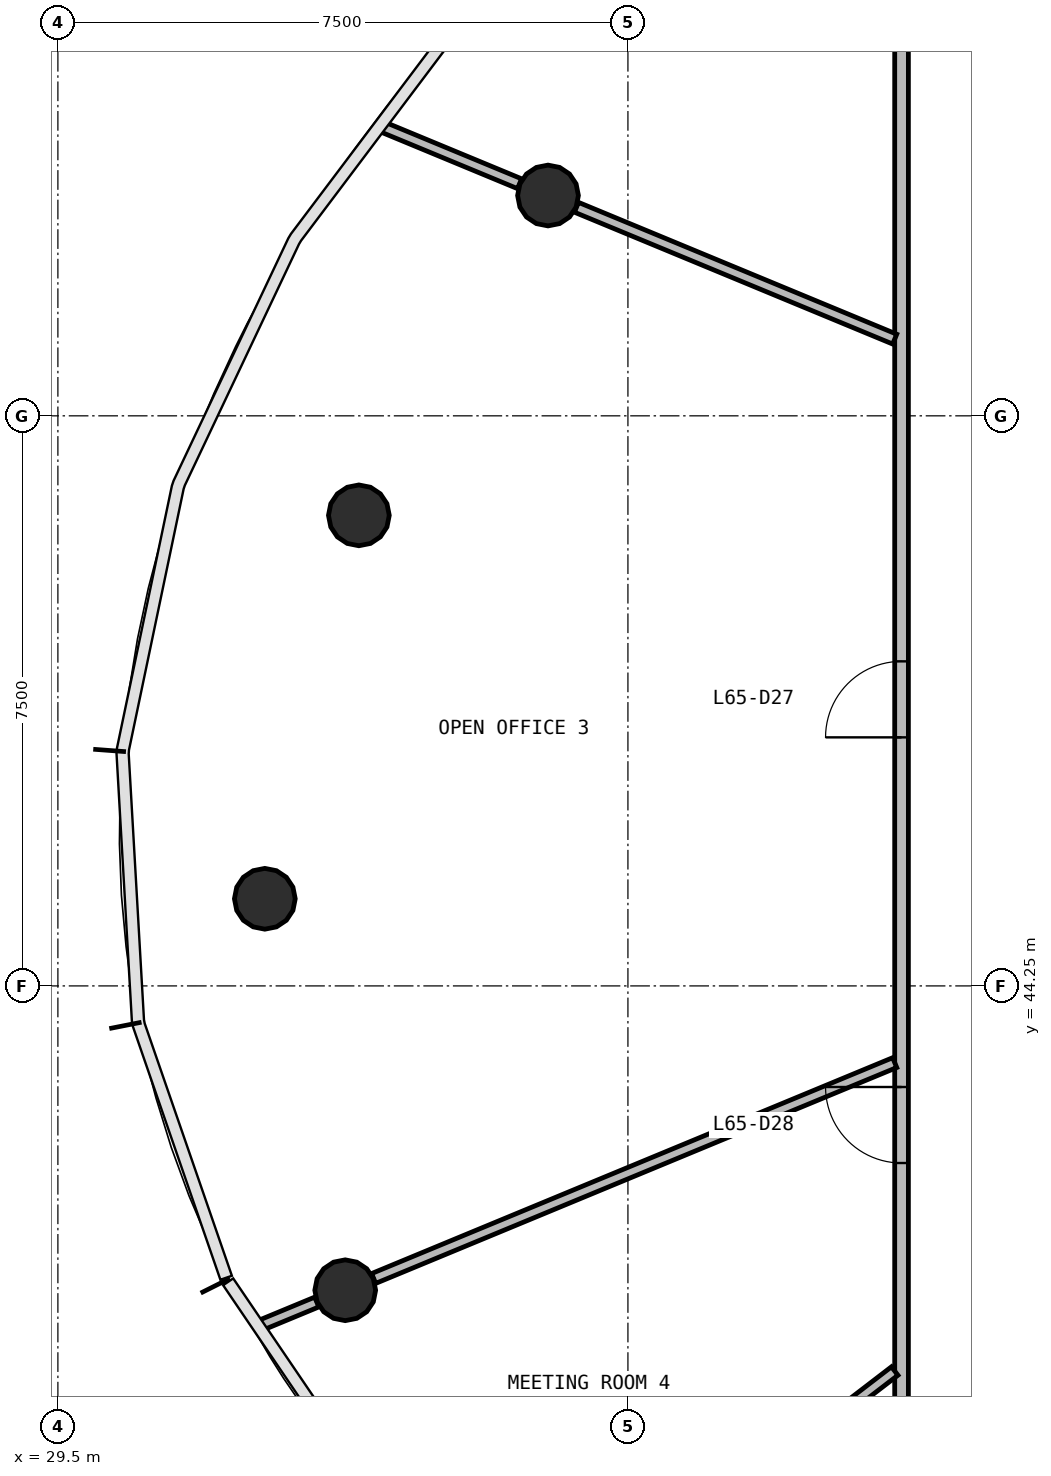
"""IFC4 building model, lengths in metres.
Left out: names, types, materials, properties, quantities, classifications, styles, units other than length and angle.
Written with IfcOpenShell. Run it as: python <this file> out.ifc"""

import sys

from ifc_helpers import new_model, si_unit, direction, frame, frame_2d, origin, origin_2d, place, context, subcontext, project, spatial, rectangle, circle, extrude, source, transform, mapped, element, fill, save


model = new_model("IFC4")
c1 = context("Model", 3, precision=1e-05, world=origin(), true_north=direction((0.0, 1.0)))
c2 = subcontext(c1, "Body", "Model", "MODEL_VIEW")
j1 = project(units=[si_unit("LENGTHUNIT", "METRE"), si_unit("PLANEANGLEUNIT", "RADIAN")], contexts=[c1])
p1 = place(None, origin())
s1 = spatial("IfcSite", under=j1, at=p1, CompositionType="ELEMENT")
p2 = place(p1, origin())
s2 = spatial("IfcBuilding", under=s1, at=p2, CompositionType="ELEMENT")
p3 = place(p2, frame((0.0, 0.0, 265.7)))
s3 = spatial("IfcBuildingStorey", under=s2, at=p3, CompositionType="ELEMENT", Elevation=265.7)
m1 = source(origin(), c2, "Body", "SweptSolid", [
    extrude(circle(Radius=0.4, at=origin_2d()), origin(), (0.0, 0.0, 1.0), 3.9),
])
for number, where, z_axis, x_axis in (
    (1, (35.948, 54.649, 0.0), (0.0, 0.0, 1.0), (1.0, 0.0, 0.0)),
    (2, (33.46, 50.441, 0.0), (0.0, 0.0, 1.0), (1.0, 0.0, 0.0)),
    (3, (32.223, 45.396, 0.0), (0.0, 0.0, 1.0), (1.0, 0.0, 0.0)),
    (4, (33.281, 40.246, 0.0), (0.0, 0.0, 1.0), (1.0, 0.0, 0.0)),
):
    element("IfcColumn", number, at=place(p3, frame(where, z_axis=z_axis, x_axis=x_axis)), inside=s3, PredefinedType="COLUMN", context=c2, shape_type="MappedRepresentation", body=[
        mapped(m1, transform((0.0, 0.0, 0.0), scale=1.0)),
    ])
p4 = place(p3, frame((40.6, 37.63, 0.0), z_axis=(0.0, 0.0, 1.0), x_axis=(0.0, 1.0, 0.0)))
e5 = element("IfcWall", 5, at=p4, inside=s3, PredefinedType="PARTITIONING", context=c2, shape_type="SweptSolid", body=[
    extrude(rectangle(XDim=20.74, YDim=0.18, at=frame_2d((10.37, 0.0))), origin(), (0.0, 0.0, 1.0), 2.92),
])
p5 = place(p4, frame((9.89, 0.0, 0.0)))
e6 = element("IfcOpeningElement", 6, at=p5, cuts=e5, PredefinedType="OPENING", context=c2, shape_type="SweptSolid", body=[
    extrude(rectangle(XDim=1.0, YDim=2.1, at=frame_2d((0.5, 1.05))), frame((0.0, 0.1, 0.0), z_axis=(0.0, -1.0, 0.0), x_axis=(1.0, 0.0, 0.0)), (0.0, 0.0, 1.0), 0.2),
])
p6 = place(p4, frame((4.29, 0.0, 0.0)))
e7 = element("IfcOpeningElement", 7, at=p6, cuts=e5, PredefinedType="OPENING", context=c2, shape_type="SweptSolid", body=[
    extrude(rectangle(XDim=1.0, YDim=2.1, at=frame_2d((0.5, 1.05))), frame((0.0, 0.1, 0.0), z_axis=(0.0, -1.0, 0.0), x_axis=(1.0, 0.0, 0.0)), (0.0, 0.0, 1.0), 0.2),
])
p7 = place(p3, frame((40.51, 43.241, 0.0), z_axis=(0.0, 0.0, 1.0), x_axis=(-0.92388089155, -0.38268015134, 0.0)))
e8 = element("IfcWall", 8, at=p7, inside=s3, PredefinedType="PARTITIONING", context=c2, shape_type="SweptSolid", body=[
    extrude(rectangle(XDim=7.42, YDim=0.14, at=frame_2d((3.71, 0.0))), origin(), (0.0, 0.0, 1.0), 2.92),
])
p8 = place(p3, frame((40.51, 52.759, 0.0), z_axis=(0.0, 0.0, 1.0), x_axis=(-0.923863854318, 0.382721280679, 0.0)))
e9 = element("IfcWall", 9, at=p8, inside=s3, PredefinedType="PARTITIONING", context=c2, shape_type="SweptSolid", body=[
    extrude(rectangle(XDim=4.532, YDim=0.14, at=frame_2d((2.266, 0.0))), origin(), (0.0, 0.0, 1.0), 2.92),
])
p9 = place(p3, frame((40.51, 39.183, 0.0), z_axis=(0.0, 0.0, 1.0), x_axis=(-0.793358616255, -0.608754553177, 0.0)))
e10 = element("IfcWall", 10, at=p9, inside=s3, PredefinedType="PARTITIONING", context=c2, shape_type="SweptSolid", body=[
    extrude(rectangle(XDim=4.284, YDim=0.14, at=frame_2d((2.142, 0.0))), origin(), (0.0, 0.0, 1.0), 2.92),
])
p10 = place(p3, frame((35.574, 54.804, 0.0), z_axis=(0.0, 0.0, 1.0), x_axis=(-0.923874199787, 0.382696306447, 0.0)))
e11 = element("IfcWall", 11, at=p10, inside=s3, PredefinedType="PARTITIONING", context=c2, shape_type="SweptSolid", body=[
    extrude(rectangle(XDim=1.961, YDim=0.14, at=frame_2d((0.98, 0.0))), origin(), (0.0, 0.0, 1.0), 2.92),
])
p11 = place(p3, frame((32.906, 40.091, 0.0), z_axis=(0.0, 0.0, 1.0), x_axis=(-0.923945811289, -0.382523382031, 0.0)))
e12 = element("IfcWall", 12, at=p11, inside=s3, PredefinedType="PARTITIONING", context=c2, shape_type="SweptSolid", body=[
    extrude(rectangle(XDim=0.796, YDim=0.14, at=frame_2d((0.398, 0.0))), origin(), (0.0, 0.0, 1.0), 2.92),
])
m2 = source(origin(), c2, "Body", "SweptSolid", [
    extrude(rectangle(XDim=1.0, YDim=2.1, at=frame_2d((0.5, 1.05))), frame((0.0, 0.025, 0.0), z_axis=(0.0, -1.0, 0.0), x_axis=(1.0, 0.0, 0.0)), (0.0, 0.0, 1.0), 0.05),
])
p12 = place(p5, origin())
e13 = element("IfcDoor", 13, at=p12, inside=s3, OperationType="SINGLE_SWING_LEFT", PredefinedType="DOOR", context=c2, shape_type="MappedRepresentation", body=[
    mapped(m2, transform((0.0, 0.0, 0.0), scale=1.0)),
])
fill(e6, e13)
p13 = place(p6, origin())
e14 = element("IfcDoor", 14, at=p13, inside=s3, OperationType="SINGLE_SWING_RIGHT", PredefinedType="DOOR", context=c2, shape_type="MappedRepresentation", body=[
    mapped(m2, transform((0.0, 0.0, 0.0), scale=1.0)),
])
fill(e7, e14)
save(model, sys.argv[1])
